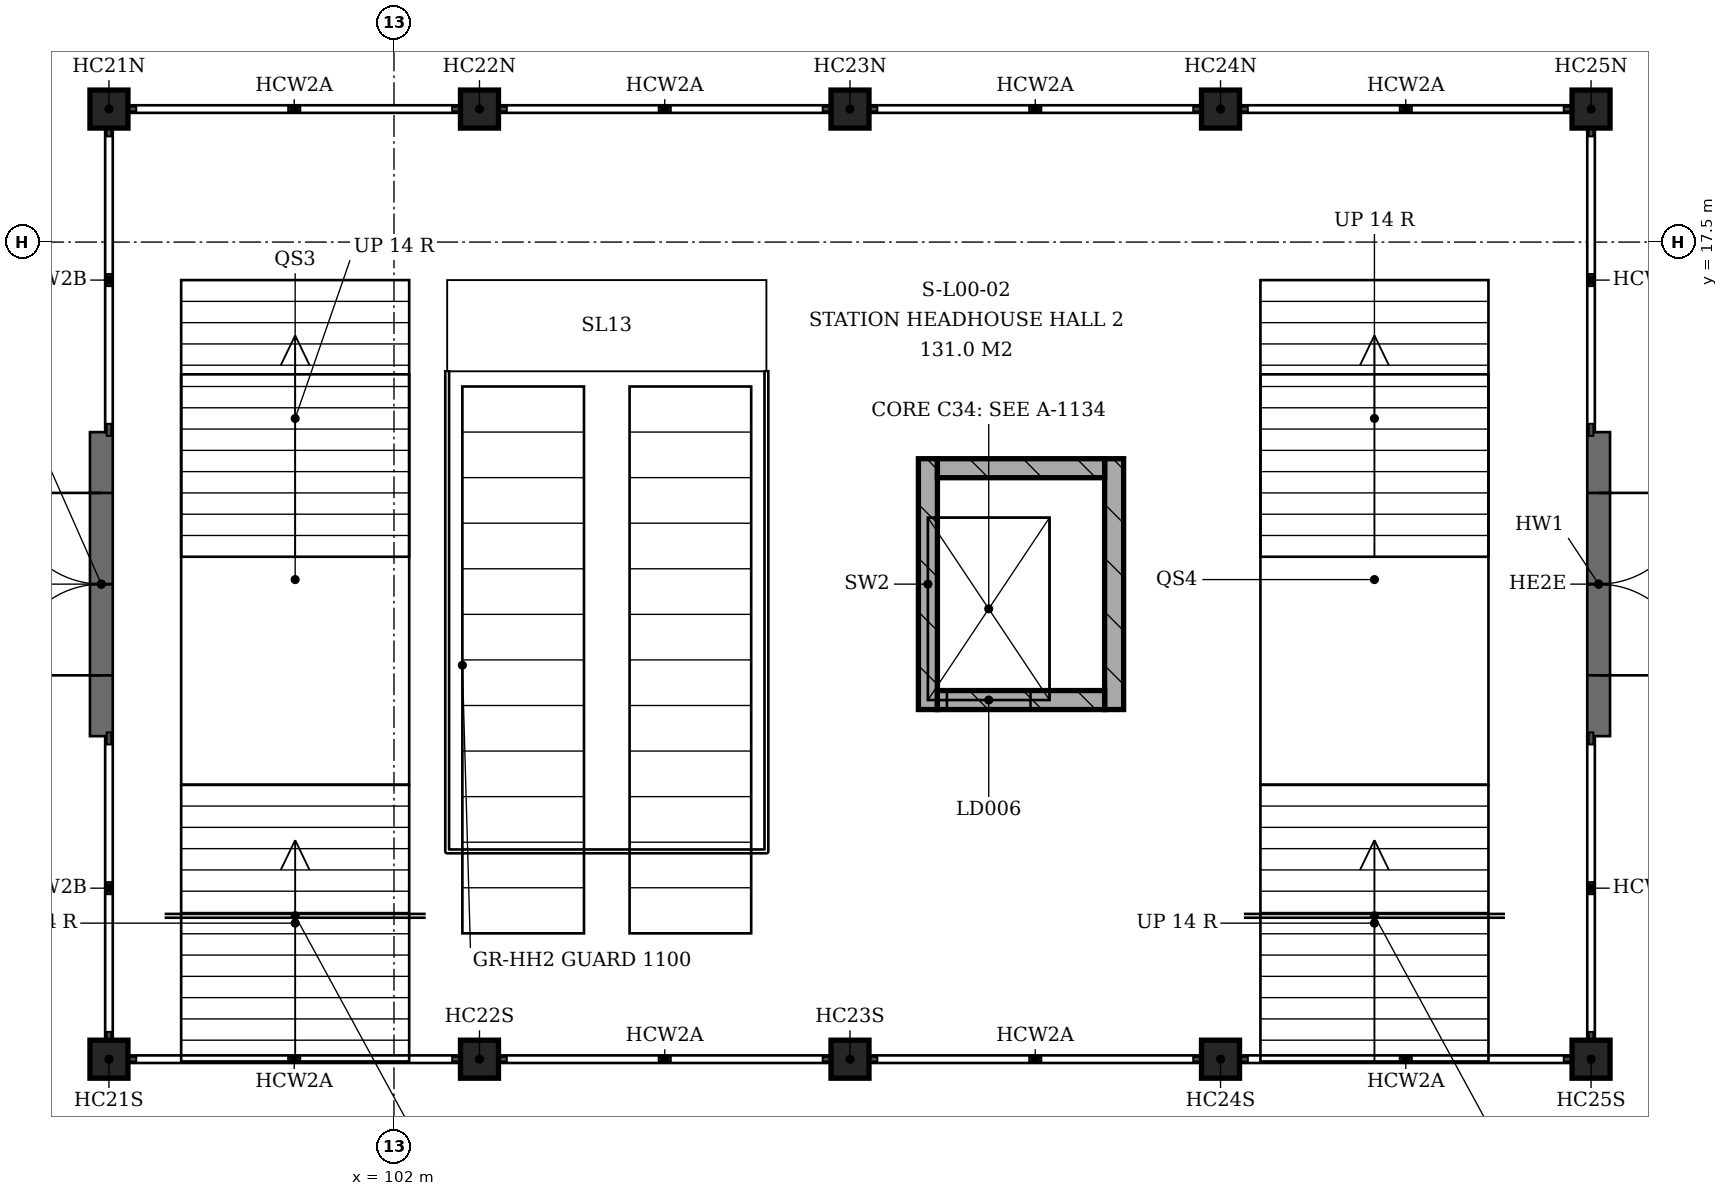
"""IFC4 building model, lengths in metres.
Left out: names, types, materials, properties, quantities, classifications, styles, units other than length and angle.
Written with IfcOpenShell. Run it as: python <this file> out.ifc"""

import sys

from ifc_helpers import new_model, si_unit, direction, frame, frame_2d, origin, origin_2d, place, context, subcontext, project, spatial, rectangle, extrude, element, fill, save


model = new_model("IFC4")
c1 = context("Model", 3, precision=1e-05, world=origin(), true_north=direction((0.0, 1.0)))
c2 = subcontext(c1, "Body", "Model", "MODEL_VIEW")
j1 = project(units=[si_unit("LENGTHUNIT", "METRE"), si_unit("PLANEANGLEUNIT", "RADIAN")], contexts=[c1])
p1 = place(None, origin())
s1 = spatial("IfcSite", under=j1, at=p1, CompositionType="ELEMENT")
p2 = place(p1, origin())
s2 = spatial("IfcBuilding", under=s1, at=p2, CompositionType="ELEMENT")
p3 = place(p2, origin())
s3 = spatial("IfcBuildingStorey", under=s2, at=p3, CompositionType="ELEMENT", Elevation=0.0)
for number, where, z_axis, x_axis in (
    (1, (109.025, 11.35, 0.0), (0.0, 0.0, 1.0), (0.0, 1.0, 0.0)),
    (2, (111.475, 11.35, 0.0), (0.0, 0.0, 1.0), (0.0, 1.0, 0.0)),
):
    element("IfcWall", number, at=place(p3, frame(where, z_axis=z_axis, x_axis=x_axis)), inside=s3, PredefinedType="SHEAR", context=c2, shape_type="SweptSolid", body=[
        extrude(rectangle(XDim=3.3, YDim=0.25, at=frame_2d((1.65, 0.0))), origin(), (0.0, 0.0, 1.0), 5.5),
    ])
p4 = place(p3, frame((109.15, 11.475, 0.0), z_axis=(0.0, 0.0, 1.0), x_axis=(1.0, 0.0, 0.0)))
e3 = element("IfcWall", 3, at=p4, inside=s3, PredefinedType="SHEAR", context=c2, shape_type="SweptSolid", body=[
    extrude(rectangle(XDim=2.2, YDim=0.25, at=frame_2d((1.1, 0.0))), origin(), (0.0, 0.0, 1.0), 5.5),
])
p5 = place(p4, frame((0.125, 0.0, 0.0)))
e4 = element("IfcOpeningElement", 4, at=p5, cuts=e3, PredefinedType="OPENING", context=c2, shape_type="SweptSolid", body=[
    extrude(rectangle(XDim=1.1, YDim=2.1, at=frame_2d((0.55, 1.05))), frame((0.0, 0.125, 0.0), z_axis=(0.0, -1.0, 0.0), x_axis=(1.0, 0.0, 0.0)), (0.0, 0.0, 1.0), 0.25),
])
p6 = place(p3, frame((109.15, 14.525, 0.0), z_axis=(0.0, 0.0, 1.0), x_axis=(1.0, 0.0, 0.0)))
e5 = element("IfcWall", 5, at=p6, inside=s3, PredefinedType="SHEAR", context=c2, shape_type="SweptSolid", body=[
    extrude(rectangle(XDim=2.2, YDim=0.25, at=frame_2d((1.1, 0.0))), origin(), (0.0, 0.0, 1.0), 5.5),
])
for number, where, z_axis, x_axis in (
    (6, (98.25, 6.75, 0.0), (0.0, 0.0, 1.0), (1.0, 0.0, 0.0)),
    (7, (98.25, 19.25, 0.0), (0.0, 0.0, 1.0), (1.0, 0.0, 0.0)),
    (8, (103.125, 6.75, 0.0), (0.0, 0.0, 1.0), (1.0, 0.0, 0.0)),
    (9, (103.125, 19.25, 0.0), (0.0, 0.0, 1.0), (1.0, 0.0, 0.0)),
    (10, (108.0, 6.75, 0.0), (0.0, 0.0, 1.0), (1.0, 0.0, 0.0)),
    (11, (108.0, 19.25, 0.0), (0.0, 0.0, 1.0), (1.0, 0.0, 0.0)),
    (12, (112.875, 6.75, 0.0), (0.0, 0.0, 1.0), (1.0, 0.0, 0.0)),
    (13, (112.875, 19.25, 0.0), (0.0, 0.0, 1.0), (1.0, 0.0, 0.0)),
    (14, (117.75, 6.75, 0.0), (0.0, 0.0, 1.0), (1.0, 0.0, 0.0)),
    (15, (117.75, 19.25, 0.0), (0.0, 0.0, 1.0), (1.0, 0.0, 0.0)),
):
    element("IfcColumn", number, at=place(p3, frame(where, z_axis=z_axis, x_axis=x_axis)), inside=s3, PredefinedType="COLUMN", context=c2, shape_type="SweptSolid", body=[
        extrude(rectangle(XDim=0.5, YDim=0.5, at=origin_2d()), origin(), (0.0, 0.0, 1.0), 5.5),
    ])
p7 = place(p3, frame((98.15, 11.0, 0.0), z_axis=(0.0, 0.0, 1.0), x_axis=(0.0, 1.0, 0.0)))
e16 = element("IfcWall", 16, at=p7, inside=s3, PredefinedType="SOLIDWALL", context=c2, shape_type="SweptSolid", body=[
    extrude(rectangle(XDim=4.0, YDim=0.3, at=frame_2d((2.0, 0.0))), origin(), (0.0, 0.0, 1.0), 4.8),
])
p8 = place(p7, frame((0.8, 0.0, 0.0)))
e17 = element("IfcOpeningElement", 17, at=p8, cuts=e16, PredefinedType="OPENING", context=c2, shape_type="SweptSolid", body=[
    extrude(rectangle(XDim=2.4, YDim=2.7, at=frame_2d((1.2, 1.35))), frame((0.0, 0.15, 0.0), z_axis=(0.0, -1.0, 0.0), x_axis=(1.0, 0.0, 0.0)), (0.0, 0.0, 1.0), 0.3),
])
p9 = place(p3, frame((117.85, 11.0, 0.0), z_axis=(0.0, 0.0, 1.0), x_axis=(0.0, 1.0, 0.0)))
e18 = element("IfcWall", 18, at=p9, inside=s3, PredefinedType="SOLIDWALL", context=c2, shape_type="SweptSolid", body=[
    extrude(rectangle(XDim=4.0, YDim=0.3, at=frame_2d((2.0, 0.0))), origin(), (0.0, 0.0, 1.0), 4.8),
])
p10 = place(p9, frame((0.8, 0.0, 0.0)))
e19 = element("IfcOpeningElement", 19, at=p10, cuts=e18, PredefinedType="OPENING", context=c2, shape_type="SweptSolid", body=[
    extrude(rectangle(XDim=2.4, YDim=2.7, at=frame_2d((1.2, 1.35))), frame((0.0, 0.15, 0.0), z_axis=(0.0, -1.0, 0.0), x_axis=(1.0, 0.0, 0.0)), (0.0, 0.0, 1.0), 0.3),
])
p11 = place(p5, origin())
e20 = element("IfcDoor", 20, at=p11, inside=s3, OperationType="SLIDING_TO_LEFT", PredefinedType="DOOR", context=c2, shape_type="SweptSolid", body=[
    extrude(rectangle(XDim=1.1, YDim=2.1, at=frame_2d((0.55, 1.05))), frame((0.0, 0.025, 0.0), z_axis=(0.0, -1.0, 0.0), x_axis=(1.0, 0.0, 0.0)), (0.0, 0.0, 1.0), 0.05),
])
fill(e4, e20)
p12 = place(p8, origin())
e21 = element("IfcDoor", 21, at=p12, inside=s3, OperationType="DOUBLE_DOOR_SINGLE_SWING", PredefinedType="DOOR", context=c2, shape_type="SweptSolid", body=[
    extrude(rectangle(XDim=2.4, YDim=2.7, at=frame_2d((1.2, 1.35))), frame((0.0, 0.025, 0.0), z_axis=(0.0, -1.0, 0.0), x_axis=(1.0, 0.0, 0.0)), (0.0, 0.0, 1.0), 0.05),
])
fill(e17, e21)
p13 = place(p10, frame((2.4, 0.0, 0.0), z_axis=(0.0, 0.0, 1.0), x_axis=(-1.0, 0.0, 0.0)))
e22 = element("IfcDoor", 22, at=p13, inside=s3, OperationType="DOUBLE_DOOR_SINGLE_SWING", PredefinedType="DOOR", context=c2, shape_type="SweptSolid", body=[
    extrude(rectangle(XDim=2.4, YDim=2.7, at=frame_2d((1.2, 1.35))), frame((0.0, 0.025, 0.0), z_axis=(0.0, -1.0, 0.0), x_axis=(1.0, 0.0, 0.0)), (0.0, 0.0, 1.0), 0.05),
])
fill(e19, e22)
save(model, sys.argv[1])
